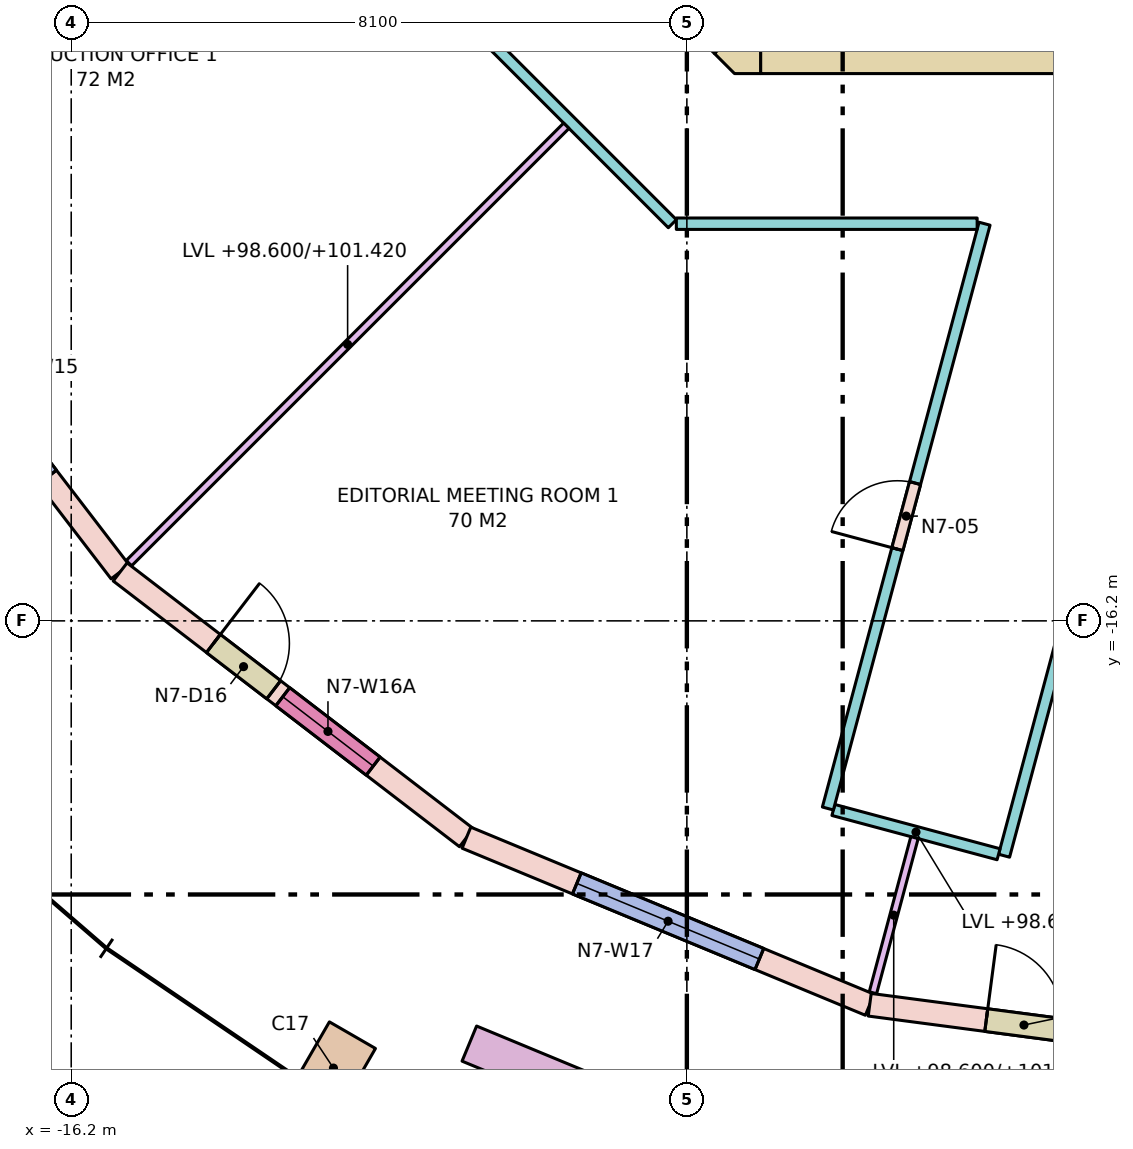
"""IFC4 building model, lengths in metres.
Left out: names, types, materials, properties, quantities, classifications, styles, units other than length and angle.
Written with IfcOpenShell. Run it as: python <this file> out.ifc"""

import sys

from ifc_helpers import new_model, si_unit, direction, frame, frame_2d, origin, origin_2d, place, context, subcontext, project, spatial, polyline, rectangle, outline, extrude, element, fill, save


model = new_model("IFC4")
c1 = context("Model", 3, precision=1e-05, world=origin(), true_north=direction((0.0, 1.0)))
c2 = subcontext(c1, "Body", "Model", "MODEL_VIEW")
j1 = project(units=[si_unit("LENGTHUNIT", "METRE"), si_unit("PLANEANGLEUNIT", "RADIAN")], contexts=[c1])
p1 = place(None, origin())
s1 = spatial("IfcSite", under=j1, at=p1, CompositionType="ELEMENT")
p2 = place(p1, origin())
s2 = spatial("IfcBuilding", under=s1, at=p2, CompositionType="ELEMENT")
p3 = place(p2, frame((0.0, 0.0, 98.6)))
s3 = spatial("IfcBuildingStorey", under=s2, at=p3, CompositionType="ELEMENT", Elevation=98.6)
p4 = place(p3, frame((-12.75, -22.084, 0.0), z_axis=(0.0, 0.0, 1.0), x_axis=(0.866025403784, -0.5, 0.0)))
e1 = element("IfcColumn", 1, at=p4, inside=s3, PredefinedType="COLUMN", context=c2, shape_type="SweptSolid", body=[
    extrude(rectangle(XDim=0.7, YDim=1.0, at=origin_2d()), origin(), (0.0, 0.0, 1.0), 4.0),
])
p5 = place(p3, frame((-7.13, -8.55, -0.28), z_axis=(0.0, 0.0, 1.0), x_axis=(1.0, 0.0, 0.0)))
e2 = element("IfcWall", 2, at=p5, inside=s3, PredefinedType="SHEAR", context=c2, shape_type="SweptSolid", body=[
    extrude(rectangle(XDim=14.26, YDim=0.9, at=frame_2d((7.13, 0.0))), origin(), (0.0, 0.0, 1.0), 4.0),
])
p6 = place(p5, frame((8.08, 0.0, 0.28)))
e3 = element("IfcOpeningElement", 3, at=p6, cuts=e2, PredefinedType="OPENING", context=c2, shape_type="SweptSolid", body=[
    extrude(rectangle(XDim=0.7, YDim=2.1, at=frame_2d((0.35, 1.05))), frame((0.0, 0.46, 0.0), z_axis=(0.0, -1.0, 0.0), x_axis=(1.0, 0.0, 0.0)), (0.0, 0.0, 1.0), 0.92),
])
p7 = place(p5, frame((5.58, 0.0, 0.28)))
e4 = element("IfcOpeningElement", 4, at=p7, cuts=e2, PredefinedType="OPENING", context=c2, shape_type="SweptSolid", body=[
    extrude(rectangle(XDim=0.85, YDim=2.1, at=frame_2d((0.425, 1.05))), frame((0.0, 0.46, 0.0), z_axis=(0.0, -1.0, 0.0), x_axis=(1.0, 0.0, 0.0)), (0.0, 0.0, 1.0), 0.92),
])
p8 = place(p5, frame((6.88, 0.0, 0.28)))
e5 = element("IfcOpeningElement", 5, at=p8, cuts=e2, PredefinedType="OPENING", context=c2, shape_type="SweptSolid", body=[
    extrude(rectangle(XDim=0.85, YDim=2.1, at=frame_2d((0.425, 1.05))), frame((0.0, 0.46, 0.0), z_axis=(0.0, -1.0, 0.0), x_axis=(1.0, 0.0, 0.0)), (0.0, 0.0, 1.0), 0.92),
])
p9 = place(p5, frame((9.445, 0.0, 0.28)))
e6 = element("IfcOpeningElement", 6, at=p9, cuts=e2, PredefinedType="OPENING", context=c2, shape_type="SweptSolid", body=[
    extrude(rectangle(XDim=0.9, YDim=2.1, at=frame_2d((0.45, 1.05))), frame((0.0, 0.46, 0.0), z_axis=(0.0, -1.0, 0.0), x_axis=(1.0, 0.0, 0.0)), (0.0, 0.0, 1.0), 0.92),
])
p10 = place(p5, frame((11.431, 0.0, 0.28)))
e7 = element("IfcOpeningElement", 7, at=p10, cuts=e2, PredefinedType="OPENING", context=c2, shape_type="SweptSolid", body=[
    extrude(rectangle(XDim=0.9, YDim=2.1, at=frame_2d((0.45, 1.05))), frame((0.0, 0.46, 0.0), z_axis=(0.0, -1.0, 0.0), x_axis=(1.0, 0.0, 0.0)), (0.0, 0.0, 1.0), 0.92),
])
p11 = place(p3, frame((-7.418, -8.418, -0.28), z_axis=(0.0, 0.0, 1.0), x_axis=(-0.707106781187, 0.707106781187, 0.0)))
e8 = element("IfcWall", 8, at=p11, inside=s3, PredefinedType="SHEAR", context=c2, shape_type="SweptSolid", body=[
    extrude(rectangle(XDim=4.243, YDim=0.9, at=frame_2d((2.121, 0.0))), origin(), (0.0, 0.0, 1.0), 4.0),
])
p12 = place(p11, frame((2.393, 0.0, 0.28)))
e9 = element("IfcOpeningElement", 9, at=p12, cuts=e8, PredefinedType="OPENING", context=c2, shape_type="SweptSolid", body=[
    extrude(rectangle(XDim=1.2, YDim=2.1, at=frame_2d((0.6, 1.05))), frame((0.0, 0.46, 0.0), z_axis=(0.0, -1.0, 0.0), x_axis=(1.0, 0.0, 0.0)), (0.0, 0.0, 1.0), 0.92),
])
p13 = place(p3, frame((0.0, 0.0, -0.28)))
e10 = element("IfcWall", 10, at=p13, inside=s3, PredefinedType="SHEAR", context=c2, shape_type="SweptSolid", body=[
    extrude(outline(polyline([(-7.473, -9.0), (-7.736, -8.736), (-7.13, -8.13), (-7.13, -9.0), (-7.473, -9.0)])), origin(), (0.0, 0.0, 1.0), 4.0),
])
p14 = place(p3, frame((-19.052, -11.0, 0.0), z_axis=(0.0, 0.0, 1.0), x_axis=(0.608744744291, -0.793366142647, 0.0)))
e11 = element("IfcWall", 11, at=p14, inside=s3, PredefinedType="STANDARD", context=c2, shape_type="SweptSolid", body=[
    extrude(rectangle(XDim=5.743, YDim=0.3, at=frame_2d((2.872, 0.0))), origin(), (0.0, 0.0, 1.0), 3.72),
])
p15 = place(p14, frame((1.572, 0.0, 0.8)))
e12 = element("IfcOpeningElement", 12, at=p15, cuts=e11, PredefinedType="OPENING", context=c2, shape_type="SweptSolid", body=[
    extrude(rectangle(XDim=2.6, YDim=2.7, at=frame_2d((1.3, 1.35))), frame((0.0, 0.16, 0.0), z_axis=(0.0, -1.0, 0.0), x_axis=(1.0, 0.0, 0.0)), (0.0, 0.0, 1.0), 0.32),
])
p16 = place(p3, frame((-15.556, -15.556, 0.0), z_axis=(0.0, 0.0, 1.0), x_axis=(0.793366142647, -0.608744744291, 0.0)))
e13 = element("IfcWall", 13, at=p16, inside=s3, PredefinedType="STANDARD", context=c2, shape_type="SweptSolid", body=[
    extrude(rectangle(XDim=5.743, YDim=0.3, at=frame_2d((2.872, 0.0))), origin(), (0.0, 0.0, 1.0), 3.72),
])
p17 = place(p16, frame((1.547, 0.0, 0.0)))
e14 = element("IfcOpeningElement", 14, at=p17, cuts=e13, PredefinedType="OPENING", context=c2, shape_type="SweptSolid", body=[
    extrude(rectangle(XDim=1.0, YDim=2.4, at=frame_2d((0.5, 1.2))), frame((0.0, 0.16, 0.0), z_axis=(0.0, -1.0, 0.0), x_axis=(1.0, 0.0, 0.0)), (0.0, 0.0, 1.0), 0.32),
])
p18 = place(p16, frame((2.697, 0.0, 0.8)))
e15 = element("IfcOpeningElement", 15, at=p18, cuts=e13, PredefinedType="OPENING", context=c2, shape_type="SweptSolid", body=[
    extrude(rectangle(XDim=1.5, YDim=2.7, at=frame_2d((0.75, 1.35))), frame((0.0, 0.16, 0.0), z_axis=(0.0, -1.0, 0.0), x_axis=(1.0, 0.0, 0.0)), (0.0, 0.0, 1.0), 0.32),
])
p19 = place(p3, frame((-11.0, -19.052, 0.0), z_axis=(0.0, 0.0, 1.0), x_axis=(0.923866055759, -0.382715966503, 0.0)))
e16 = element("IfcWall", 16, at=p19, inside=s3, PredefinedType="STANDARD", context=c2, shape_type="SweptSolid", body=[
    extrude(rectangle(XDim=5.743, YDim=0.3, at=frame_2d((2.872, 0.0))), origin(), (0.0, 0.0, 1.0), 3.72),
])
p20 = place(p19, frame((1.572, 0.0, 0.8)))
e17 = element("IfcOpeningElement", 17, at=p20, cuts=e16, PredefinedType="OPENING", context=c2, shape_type="SweptSolid", body=[
    extrude(rectangle(XDim=2.6, YDim=2.7, at=frame_2d((1.3, 1.35))), frame((0.0, 0.16, 0.0), z_axis=(0.0, -1.0, 0.0), x_axis=(1.0, 0.0, 0.0)), (0.0, 0.0, 1.0), 0.32),
])
p21 = place(p3, frame((-5.694, -21.25, 0.0), z_axis=(0.0, 0.0, 1.0), x_axis=(0.991447783331, -0.130503995834, 0.0)))
e18 = element("IfcWall", 18, at=p21, inside=s3, PredefinedType="STANDARD", context=c2, shape_type="SweptSolid", body=[
    extrude(rectangle(XDim=5.743, YDim=0.3, at=frame_2d((2.872, 0.0))), origin(), (0.0, 0.0, 1.0), 3.72),
])
p22 = place(p21, frame((1.547, 0.0, 0.0)))
e19 = element("IfcOpeningElement", 19, at=p22, cuts=e18, PredefinedType="OPENING", context=c2, shape_type="SweptSolid", body=[
    extrude(rectangle(XDim=1.0, YDim=2.4, at=frame_2d((0.5, 1.2))), frame((0.0, 0.16, 0.0), z_axis=(0.0, -1.0, 0.0), x_axis=(1.0, 0.0, 0.0)), (0.0, 0.0, 1.0), 0.32),
])
p23 = place(p21, frame((2.697, 0.0, 0.8)))
e20 = element("IfcOpeningElement", 20, at=p23, cuts=e18, PredefinedType="OPENING", context=c2, shape_type="SweptSolid", body=[
    extrude(rectangle(XDim=1.5, YDim=2.7, at=frame_2d((0.75, 1.35))), frame((0.0, 0.16, 0.0), z_axis=(0.0, -1.0, 0.0), x_axis=(1.0, 0.0, 0.0)), (0.0, 0.0, 1.0), 0.32),
])
p24 = place(p3, frame((-10.962, -21.761, 0.0), z_axis=(0.0, 0.0, 1.0), x_axis=(0.923875488976, -0.382693194178, 0.0)))
e21 = element("IfcWall", 21, at=p24, inside=s3, PredefinedType="PARAPET", context=c2, shape_type="SweptSolid", body=[
    extrude(rectangle(XDim=3.6, YDim=0.5, at=frame_2d((1.8, 0.0))), origin(), (0.0, 0.0, 1.0), 0.9),
])
p25 = place(p3, frame((-8.291, -10.975, 0.0), z_axis=(0.0, 0.0, 1.0), x_axis=(-0.707106781187, 0.707106781187, 0.0)))
e22 = element("IfcWall", 22, at=p25, inside=s3, PredefinedType="PARTITIONING", context=c2, shape_type="SweptSolid", body=[
    extrude(rectangle(XDim=6.624, YDim=0.15, at=frame_2d((3.312, 0.0))), origin(), (0.0, 0.0, 1.0), 2.82),
])
p26 = place(p25, frame((3.786, 0.0, 0.0)))
e23 = element("IfcOpeningElement", 23, at=p26, cuts=e22, PredefinedType="OPENING", context=c2, shape_type="SweptSolid", body=[
    extrude(rectangle(XDim=0.9, YDim=2.1, at=frame_2d((0.45, 1.05))), frame((0.0, 0.085, 0.0), z_axis=(0.0, -1.0, 0.0), x_axis=(1.0, 0.0, 0.0)), (0.0, 0.0, 1.0), 0.17),
])
p27 = place(p3, frame((-1.717, -11.045, 0.0), z_axis=(0.0, 0.0, 1.0), x_axis=(-0.258794702264, -0.965932348604, 0.0)))
e24 = element("IfcWall", 24, at=p27, inside=s3, PredefinedType="PARTITIONING", context=c2, shape_type="SweptSolid", body=[
    extrude(rectangle(XDim=8.536, YDim=0.15, at=frame_2d((4.268, 0.0))), origin(), (0.0, 0.0, 1.0), 3.72),
])
p28 = place(p3, frame((-3.999, -19.271, 0.0), z_axis=(0.0, 0.0, 1.0), x_axis=(-0.965906393436, 0.258891558609, 0.0)))
e25 = element("IfcWall", 25, at=p28, inside=s3, PredefinedType="PARTITIONING", context=c2, shape_type="SweptSolid", body=[
    extrude(rectangle(XDim=2.25, YDim=0.15, at=frame_2d((1.125, 0.0))), origin(), (0.0, 0.0, 1.0), 2.82),
])
p29 = place(p3, frame((-6.245, -18.669, 0.0), z_axis=(0.0, 0.0, 1.0), x_axis=(0.258822393938, 0.965924928965, 0.0)))
e26 = element("IfcWall", 26, at=p29, inside=s3, PredefinedType="PARTITIONING", context=c2, shape_type="SweptSolid", body=[
    extrude(rectangle(XDim=7.965, YDim=0.15, at=frame_2d((3.982, 0.0))), origin(), (0.0, 0.0, 1.0), 3.72),
])
p30 = place(p29, frame((3.532, 0.0, 0.0)))
e27 = element("IfcOpeningElement", 27, at=p30, cuts=e26, PredefinedType="OPENING", context=c2, shape_type="SweptSolid", body=[
    extrude(rectangle(XDim=0.9, YDim=2.1, at=frame_2d((0.45, 1.05))), frame((0.0, 0.085, 0.0), z_axis=(0.0, -1.0, 0.0), x_axis=(1.0, 0.0, 0.0)), (0.0, 0.0, 1.0), 0.17),
])
p31 = place(p3, frame((-4.281, -10.975, 0.0), z_axis=(0.0, 0.0, 1.0), x_axis=(-1.0, 0.0, 0.0)))
e28 = element("IfcWall", 28, at=p31, inside=s3, PredefinedType="PARTITIONING", context=c2, shape_type="SweptSolid", body=[
    extrude(rectangle(XDim=3.958, YDim=0.15, at=frame_2d((1.979, 0.0))), origin(), (0.0, 0.0, 1.0), 2.82),
])
p32 = place(p3, frame((-9.686, -9.686, 0.0), z_axis=(0.0, 0.0, 1.0), x_axis=(-0.707106781187, -0.707106781187, 0.0)))
e29 = element("IfcWall", 29, at=p32, inside=s3, PredefinedType="PARTITIONING", context=c2, shape_type="SweptSolid", body=[
    extrude(rectangle(XDim=8.139, YDim=0.1, at=frame_2d((4.069, 0.0))), origin(), (0.0, 0.0, 1.0), 2.82),
])
p33 = place(p3, frame((-5.105, -19.052, 0.0), z_axis=(0.0, 0.0, 1.0), x_axis=(-0.258813089189, -0.965927422152, 0.0)))
e30 = element("IfcWall", 30, at=p33, inside=s3, PredefinedType="PARTITIONING", context=c2, shape_type="SweptSolid", body=[
    extrude(rectangle(XDim=2.113, YDim=0.1, at=frame_2d((1.057, 0.0))), origin(), (0.0, 0.0, 1.0), 2.82),
])
p34 = place(p17, origin())
e31 = element("IfcDoor", 31, at=p34, inside=s3, OperationType="SINGLE_SWING_LEFT", PredefinedType="DOOR", context=c2, shape_type="SweptSolid", body=[
    extrude(rectangle(XDim=1.0, YDim=2.4, at=frame_2d((0.5, 1.2))), frame((0.0, 0.025, 0.0), z_axis=(0.0, -1.0, 0.0), x_axis=(1.0, 0.0, 0.0)), (0.0, 0.0, 1.0), 0.05),
])
fill(e14, e31)
p35 = place(p18, origin())
e32 = element("IfcWindow", 32, at=p35, inside=s3, PartitioningType="SINGLE_PANEL", PredefinedType="WINDOW", context=c2, shape_type="SweptSolid", body=[
    extrude(rectangle(XDim=1.5, YDim=2.7, at=frame_2d((0.75, 1.35))), frame((0.0, 0.03, 0.0), z_axis=(0.0, -1.0, 0.0), x_axis=(1.0, 0.0, 0.0)), (0.0, 0.0, 1.0), 0.06),
])
fill(e15, e32)
p36 = place(p20, origin())
e33 = element("IfcWindow", 33, at=p36, inside=s3, PartitioningType="SINGLE_PANEL", PredefinedType="WINDOW", context=c2, shape_type="SweptSolid", body=[
    extrude(rectangle(XDim=2.6, YDim=2.7, at=frame_2d((1.3, 1.35))), frame((0.0, 0.03, 0.0), z_axis=(0.0, -1.0, 0.0), x_axis=(1.0, 0.0, 0.0)), (0.0, 0.0, 1.0), 0.06),
])
fill(e17, e33)
p37 = place(p22, origin())
e34 = element("IfcDoor", 34, at=p37, inside=s3, OperationType="SINGLE_SWING_LEFT", PredefinedType="DOOR", context=c2, shape_type="SweptSolid", body=[
    extrude(rectangle(XDim=1.0, YDim=2.4, at=frame_2d((0.5, 1.2))), frame((0.0, 0.025, 0.0), z_axis=(0.0, -1.0, 0.0), x_axis=(1.0, 0.0, 0.0)), (0.0, 0.0, 1.0), 0.05),
])
fill(e19, e34)
p38 = place(p30, origin())
e35 = element("IfcDoor", 35, at=p38, inside=s3, OperationType="SINGLE_SWING_LEFT", PredefinedType="DOOR", context=c2, shape_type="SweptSolid", body=[
    extrude(rectangle(XDim=0.9, YDim=2.1, at=frame_2d((0.45, 1.05))), frame((0.0, 0.025, 0.0), z_axis=(0.0, -1.0, 0.0), x_axis=(1.0, 0.0, 0.0)), (0.0, 0.0, 1.0), 0.05),
])
fill(e27, e35)
save(model, sys.argv[1])
